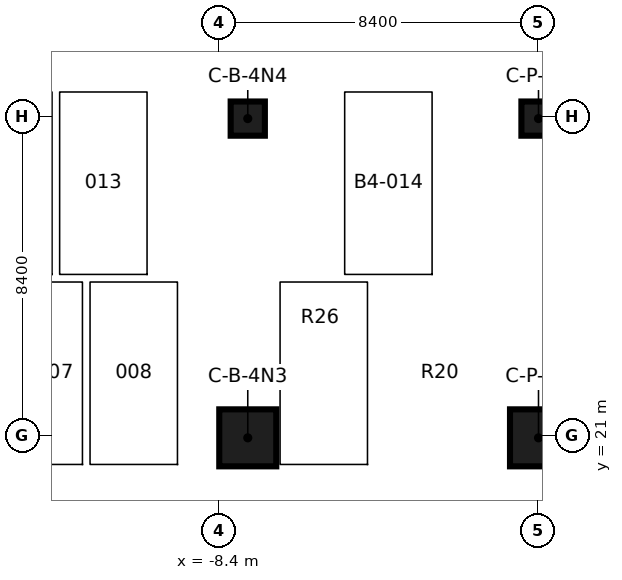
"""IFC4 building model, lengths in metres.
Left out: names, types, materials, properties, quantities, classifications, styles, units other than length and angle.
Written with IfcOpenShell. Run it as: python <this file> out.ifc"""

import sys

from ifc_helpers import new_model, si_unit, direction, frame, origin, origin_2d, place, context, subcontext, project, spatial, rectangle, extrude, element, save


model = new_model("IFC4")
c1 = context("Model", 3, precision=1e-05, world=origin(), true_north=direction((0.0, 1.0)))
c2 = subcontext(c1, "Body", "Model", "MODEL_VIEW")
j1 = project(units=[si_unit("LENGTHUNIT", "METRE"), si_unit("PLANEANGLEUNIT", "RADIAN")], contexts=[c1])
p1 = place(None, origin())
s1 = spatial("IfcSite", under=j1, at=p1, CompositionType="ELEMENT")
p2 = place(p1, origin())
s2 = spatial("IfcBuilding", under=s1, at=p2, CompositionType="ELEMENT")
p3 = place(p2, frame((0.0, 0.0, -17.0)))
s3 = spatial("IfcBuildingStorey", under=s2, at=p3, CompositionType="ELEMENT", Elevation=-17.0)
p4 = place(p3, frame((-7.65, 21.0, 0.0), z_axis=(0.0, 0.0, 1.0), x_axis=(1.0, 0.0, 0.0)))
e1 = element("IfcColumn", 1, at=p4, inside=s3, PredefinedType="COLUMN", context=c2, shape_type="SweptSolid", body=[
    extrude(rectangle(XDim=1.5, YDim=1.5, at=origin_2d()), origin(), (0.0, 0.0, 1.0), 3.7),
])
p5 = place(p3, frame((-7.65, 29.4, 0.0), z_axis=(0.0, 0.0, 1.0), x_axis=(1.0, 0.0, 0.0)))
e2 = element("IfcColumn", 2, at=p5, inside=s3, PredefinedType="COLUMN", context=c2, shape_type="SweptSolid", body=[
    extrude(rectangle(XDim=0.9, YDim=0.9, at=origin_2d()), origin(), (0.0, 0.0, 1.0), 3.7),
])
p6 = place(p3, frame((0.0, 21.0, 0.0), z_axis=(0.0, 0.0, 1.0), x_axis=(1.0, 0.0, 0.0)))
e3 = element("IfcColumn", 3, at=p6, inside=s3, PredefinedType="COLUMN", context=c2, shape_type="SweptSolid", body=[
    extrude(rectangle(XDim=1.5, YDim=1.5, at=origin_2d()), origin(), (0.0, 0.0, 1.0), 3.7),
])
p7 = place(p3, frame((0.0, 29.4, 0.0), z_axis=(0.0, 0.0, 1.0), x_axis=(1.0, 0.0, 0.0)))
e4 = element("IfcColumn", 4, at=p7, inside=s3, PredefinedType="COLUMN", context=c2, shape_type="SweptSolid", body=[
    extrude(rectangle(XDim=0.9, YDim=0.9, at=origin_2d()), origin(), (0.0, 0.0, 1.0), 3.7),
])
save(model, sys.argv[1])
